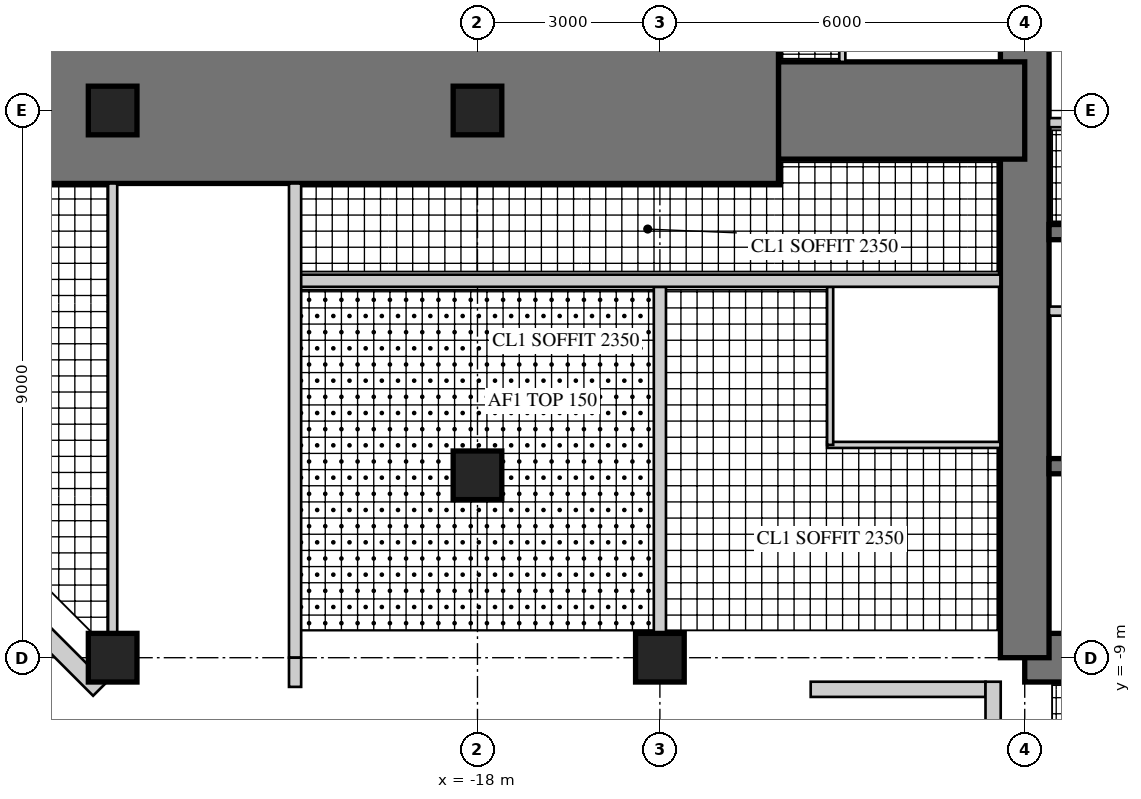
"""IFC4 building model, lengths in metres.
Left out: names, types, materials, properties, quantities, classifications, styles, units other than length and angle.
Written with IfcOpenShell. Run it as: python <this file> out.ifc"""

import sys

from ifc_helpers import new_model, si_unit, direction, frame, frame_2d, origin, origin_2d, place, context, subcontext, project, spatial, rectangle, hollow_rectangle, extrude, element, fill, save


model = new_model("IFC4")
c1 = context("Model", 3, precision=1e-05, world=origin(), true_north=direction((0.0, 1.0)))
c2 = subcontext(c1, "Body", "Model", "MODEL_VIEW")
j1 = project(units=[si_unit("LENGTHUNIT", "METRE"), si_unit("PLANEANGLEUNIT", "RADIAN")], contexts=[c1])
p1 = place(None, origin())
s1 = spatial("IfcSite", under=j1, at=p1, CompositionType="ELEMENT")
p2 = place(p1, origin())
s2 = spatial("IfcBuilding", under=s1, at=p2, CompositionType="ELEMENT")
p3 = place(p2, frame((0.0, 0.0, 242.5)))
s3 = spatial("IfcBuildingStorey", under=s2, at=p3, CompositionType="ELEMENT", Elevation=242.5)
p4 = place(p3, frame((-9.0, -9.0, 0.0), z_axis=(0.0, 0.0, 1.0), x_axis=(1.0, 0.0, 0.0)))
e1 = element("IfcWall", 1, at=p4, inside=s3, PredefinedType="SHEAR", context=c2, shape_type="SweptSolid", body=[
    extrude(rectangle(XDim=18.0, YDim=0.8, at=frame_2d((9.0, 0.0))), origin(), (0.0, 0.0, 1.0), 3.4),
])
p5 = place(p4, frame((9.8, 0.0, 0.0)))
e2 = element("IfcOpeningElement", 2, at=p5, cuts=e1, PredefinedType="OPENING", context=c2, shape_type="SweptSolid", body=[
    extrude(rectangle(XDim=1.0, YDim=2.4, at=frame_2d((0.5, 1.2))), frame((0.0, 0.41, 0.0), z_axis=(0.0, -1.0, 0.0), x_axis=(1.0, 0.0, 0.0)), (0.0, 0.0, 1.0), 0.82),
])
p6 = place(p3, frame((-9.0, 9.0, 0.0), z_axis=(0.0, 0.0, 1.0), x_axis=(0.0, -1.0, 0.0)))
e3 = element("IfcWall", 3, at=p6, inside=s3, PredefinedType="SHEAR", context=c2, shape_type="SweptSolid", body=[
    extrude(rectangle(XDim=18.0, YDim=0.8, at=frame_2d((9.0, 0.0))), origin(), (0.0, 0.0, 1.0), 3.4),
])
p7 = place(p6, frame((9.8, 0.0, 0.0)))
e4 = element("IfcOpeningElement", 4, at=p7, cuts=e3, PredefinedType="OPENING", context=c2, shape_type="SweptSolid", body=[
    extrude(rectangle(XDim=1.0, YDim=2.4, at=frame_2d((0.5, 1.2))), frame((0.0, 0.41, 0.0), z_axis=(0.0, -1.0, 0.0), x_axis=(1.0, 0.0, 0.0)), (0.0, 0.0, 1.0), 0.82),
])
p8 = place(p3, frame((-1.925, -2.0, 0.0), z_axis=(0.0, 0.0, 1.0), x_axis=(-1.0, 0.0, 0.0)))
e5 = element("IfcWall", 5, at=p8, inside=s3, PredefinedType="SHEAR", context=c2, shape_type="SweptSolid", body=[
    extrude(rectangle(XDim=6.675, YDim=0.25, at=frame_2d((3.337, 0.0))), origin(), (0.0, 0.0, 1.0), 3.4),
])
p9 = place(p3, frame((-1.925, -5.85, 0.0), z_axis=(0.0, 0.0, 1.0), x_axis=(-1.0, 0.0, 0.0)))
e6 = element("IfcWall", 6, at=p9, inside=s3, PredefinedType="SHEAR", context=c2, shape_type="SweptSolid", body=[
    extrude(rectangle(XDim=6.675, YDim=0.25, at=frame_2d((3.337, 0.0))), origin(), (0.0, 0.0, 1.0), 3.4),
])
p10 = place(p9, frame((0.496, 0.0, 0.0)))
e7 = element("IfcOpeningElement", 7, at=p10, cuts=e6, PredefinedType="OPENING", context=c2, shape_type="SweptSolid", body=[
    extrude(rectangle(XDim=1.1, YDim=2.2, at=frame_2d((0.55, 1.1))), frame((0.0, 0.135, 0.0), z_axis=(0.0, -1.0, 0.0), x_axis=(1.0, 0.0, 0.0)), (0.0, 0.0, 1.0), 0.27),
])
p11 = place(p9, frame((2.788, 0.0, 0.0)))
e8 = element("IfcOpeningElement", 8, at=p11, cuts=e6, PredefinedType="OPENING", context=c2, shape_type="SweptSolid", body=[
    extrude(rectangle(XDim=1.1, YDim=2.2, at=frame_2d((0.55, 1.1))), frame((0.0, 0.135, 0.0), z_axis=(0.0, -1.0, 0.0), x_axis=(1.0, 0.0, 0.0)), (0.0, 0.0, 1.0), 0.27),
])
p12 = place(p9, frame((5.079, 0.0, 0.0)))
e9 = element("IfcOpeningElement", 9, at=p12, cuts=e6, PredefinedType="OPENING", context=c2, shape_type="SweptSolid", body=[
    extrude(rectangle(XDim=1.1, YDim=2.2, at=frame_2d((0.55, 1.1))), frame((0.0, 0.135, 0.0), z_axis=(0.0, -1.0, 0.0), x_axis=(1.0, 0.0, 0.0)), (0.0, 0.0, 1.0), 0.27),
])
p13 = place(p3, frame((-1.925, -3.3, 0.0), z_axis=(0.0, 0.0, 1.0), x_axis=(-1.0, 0.0, 0.0)))
e10 = element("IfcWall", 10, at=p13, inside=s3, PredefinedType="PARTITIONING", context=c2, shape_type="SweptSolid", body=[
    extrude(rectangle(XDim=6.675, YDim=0.15, at=frame_2d((3.337, 0.0))), origin(), (0.0, 0.0, 1.0), 3.4),
])
p14 = place(p13, frame((0.075, 0.0, 0.0)))
e11 = element("IfcOpeningElement", 11, at=p14, cuts=e10, PredefinedType="OPENING", context=c2, shape_type="SweptSolid", body=[
    extrude(rectangle(XDim=0.8, YDim=2.1, at=frame_2d((0.4, 1.05))), frame((0.0, 0.085, 0.0), z_axis=(0.0, -1.0, 0.0), x_axis=(1.0, 0.0, 0.0)), (0.0, 0.0, 1.0), 0.17),
])
p15 = place(p13, frame((3.675, 0.0, 0.0)))
e12 = element("IfcOpeningElement", 12, at=p15, cuts=e10, PredefinedType="OPENING", context=c2, shape_type="SweptSolid", body=[
    extrude(rectangle(XDim=0.8, YDim=2.1, at=frame_2d((0.4, 1.05))), frame((0.0, 0.085, 0.0), z_axis=(0.0, -1.0, 0.0), x_axis=(1.0, 0.0, 0.0)), (0.0, 0.0, 1.0), 0.17),
])
p16 = place(p3, frame((-9.0, 0.0, 0.0), z_axis=(0.0, 0.0, 1.0), x_axis=(-1.0, 0.0, 0.0)))
e13 = element("IfcWall", 13, at=p16, inside=s3, PredefinedType="SHEAR", context=c2, shape_type="SweptSolid", body=[
    extrude(rectangle(XDim=4.05, YDim=1.6, at=frame_2d((2.025, 0.0))), origin(), (0.0, 0.0, 1.0), 3.4),
])
p17 = place(p3, frame((-13.05, 0.0, 0.0), z_axis=(0.0, 0.0, 1.0), x_axis=(-1.0, 0.0, 0.0)))
e14 = element("IfcWall", 14, at=p17, inside=s3, PredefinedType="SHEAR", context=c2, shape_type="SweptSolid", body=[
    extrude(rectangle(XDim=13.95, YDim=2.4, at=frame_2d((6.975, 0.0))), origin(), (0.0, 0.0, 1.0), 3.4),
])
p18 = place(p17, frame((0.3, 0.0, 0.0)))
e15 = element("IfcOpeningElement", 15, at=p18, cuts=e14, PredefinedType="OPENING", context=c2, shape_type="SweptSolid", body=[
    extrude(rectangle(XDim=1.0, YDim=2.15, at=frame_2d((0.5, 1.075))), frame((0.0, 1.21, 0.0), z_axis=(0.0, -1.0, 0.0), x_axis=(1.0, 0.0, 0.0)), (0.0, 0.0, 1.0), 2.42),
])
p19 = place(p17, frame((2.55, 0.0, 0.0)))
e16 = element("IfcOpeningElement", 16, at=p19, cuts=e14, PredefinedType="OPENING", context=c2, shape_type="SweptSolid", body=[
    extrude(rectangle(XDim=1.0, YDim=2.15, at=frame_2d((0.5, 1.075))), frame((0.0, 1.21, 0.0), z_axis=(0.0, -1.0, 0.0), x_axis=(1.0, 0.0, 0.0)), (0.0, 0.0, 1.0), 2.42),
])
p20 = place(p17, frame((9.25, 0.0, 0.0)))
e17 = element("IfcOpeningElement", 17, at=p20, cuts=e14, PredefinedType="OPENING", context=c2, shape_type="SweptSolid", body=[
    extrude(rectangle(XDim=1.0, YDim=2.2, at=frame_2d((0.5, 1.1))), frame((0.0, 1.21, 0.0), z_axis=(0.0, -1.0, 0.0), x_axis=(1.0, 0.0, 0.0)), (0.0, 0.0, 1.0), 2.42),
])
for number, where, z_axis, x_axis in (
    (18, (-15.0, -9.0, 0.0), (0.0, 0.0, 1.0), (1.0, 0.0, 0.0)),
    (19, (-24.0, -9.0, 0.0), (0.0, 0.0, 1.0), (1.0, 0.0, 0.0)),
    (20, (-18.0, 0.0, 0.0), (0.0, 0.0, 1.0), (1.0, 0.0, 0.0)),
    (21, (-18.0, -6.0, 0.0), (0.0, 0.0, 1.0), (1.0, 0.0, 0.0)),
    (22, (-24.0, 0.0, 0.0), (0.0, 0.0, 1.0), (1.0, 0.0, 0.0)),
):
    element("IfcColumn", number, at=place(p3, frame(where, z_axis=z_axis, x_axis=x_axis)), inside=s3, PredefinedType="COLUMN", context=c2, shape_type="SweptSolid", body=[
        extrude(rectangle(XDim=0.8, YDim=0.8, at=origin_2d()), origin(), (0.0, 0.0, 1.0), 3.4),
    ])
p21 = place(p3, frame((-27.6, -6.135, 0.0), z_axis=(0.0, 0.0, 1.0), x_axis=(0.707132283189, -0.707081278264, 0.0)))
e23 = element("IfcWall", 23, at=p21, inside=s3, PredefinedType="SOLIDWALL", context=c2, shape_type="SweptSolid", body=[
    extrude(rectangle(XDim=4.787, YDim=0.3, at=frame_2d((2.393, 0.0))), origin(), (0.0, 0.0, 1.0), 3.22),
])
p22 = place(p21, frame((1.943, 0.0, 0.3)))
e24 = element("IfcOpeningElement", 24, at=p22, cuts=e23, PredefinedType="OPENING", context=c2, shape_type="SweptSolid", body=[
    extrude(rectangle(XDim=0.9, YDim=2.4, at=frame_2d((0.45, 1.2))), frame((0.0, 0.16, 0.0), z_axis=(0.0, -1.0, 0.0), x_axis=(1.0, 0.0, 0.0)), (0.0, 0.0, 1.0), 0.32),
])
p23 = place(p3, frame((-12.52, -9.52, 0.0), z_axis=(0.0, 0.0, 1.0), x_axis=(1.0, 0.0, 0.0)))
e25 = element("IfcWall", 25, at=p23, inside=s3, PredefinedType="SOLIDWALL", context=c2, shape_type="SweptSolid", body=[
    extrude(rectangle(XDim=2.875, YDim=0.25, at=frame_2d((1.438, 0.0))), origin(), (0.0, 0.0, 1.0), 3.22),
])
p24 = place(p23, frame((0.6, 0.0, 0.0)))
e26 = element("IfcOpeningElement", 26, at=p24, cuts=e25, PredefinedType="OPENING", context=c2, shape_type="SweptSolid", body=[
    extrude(rectangle(XDim=1.0, YDim=2.2, at=frame_2d((0.5, 1.1))), frame((0.0, 0.135, 0.0), z_axis=(0.0, -1.0, 0.0), x_axis=(1.0, 0.0, 0.0)), (0.0, 0.0, 1.0), 0.27),
])
p25 = place(p3, frame((-9.52, -9.395, 0.0), z_axis=(0.0, 0.0, 1.0), x_axis=(0.0, -1.0, 0.0)))
e27 = element("IfcWall", 27, at=p25, inside=s3, PredefinedType="SOLIDWALL", context=c2, shape_type="SweptSolid", body=[
    extrude(rectangle(XDim=3.125, YDim=0.25, at=frame_2d((1.562, 0.0))), origin(), (0.0, 0.0, 1.0), 3.22),
])
p26 = place(p25, frame((0.6, 0.0, 0.0)))
e28 = element("IfcOpeningElement", 28, at=p26, cuts=e27, PredefinedType="OPENING", context=c2, shape_type="SweptSolid", body=[
    extrude(rectangle(XDim=1.0, YDim=2.2, at=frame_2d((0.5, 1.1))), frame((0.0, 0.135, 0.0), z_axis=(0.0, -1.0, 0.0), x_axis=(1.0, 0.0, 0.0)), (0.0, 0.0, 1.0), 0.27),
])
p27 = place(p3, frame((-2.325, -0.2, 0.0), z_axis=(0.0, 0.0, 1.0), x_axis=(-1.0, 0.0, 0.0)))
e29 = element("IfcWall", 29, at=p27, inside=s3, PredefinedType="PARTITIONING", context=c2, shape_type="SweptSolid", body=[
    extrude(rectangle(XDim=6.275, YDim=0.15, at=frame_2d((3.138, 0.0))), origin(), (0.0, 0.0, 1.0), 3.22),
])
p28 = place(p27, frame((0.4, 0.0, 0.0)))
e30 = element("IfcOpeningElement", 30, at=p28, cuts=e29, PredefinedType="OPENING", context=c2, shape_type="SweptSolid", body=[
    extrude(rectangle(XDim=1.0, YDim=2.1, at=frame_2d((0.5, 1.05))), frame((0.0, 0.085, 0.0), z_axis=(0.0, -1.0, 0.0), x_axis=(1.0, 0.0, 0.0)), (0.0, 0.0, 1.0), 0.17),
])
p29 = place(p3, frame((-9.4, -5.5, 0.0), z_axis=(0.0, 0.0, 1.0), x_axis=(-1.0, 0.0, 0.0)))
e31 = element("IfcWall", 31, at=p29, inside=s3, PredefinedType="PARTITIONING", context=c2, shape_type="SweptSolid", body=[
    extrude(rectangle(XDim=2.85, YDim=0.1, at=frame_2d((1.425, 0.0))), origin(), (0.0, 0.0, 1.0), 3.22),
])
p30 = place(p3, frame((-12.2, -2.9, 0.0), z_axis=(0.0, 0.0, 1.0), x_axis=(0.0, -1.0, 0.0)))
e32 = element("IfcWall", 32, at=p30, inside=s3, PredefinedType="PARTITIONING", context=c2, shape_type="SweptSolid", body=[
    extrude(rectangle(XDim=2.6, YDim=0.1, at=frame_2d((1.3, 0.0))), origin(), (0.0, 0.0, 1.0), 3.22),
])
p31 = place(p30, frame((0.55, 0.0, 0.0)))
e33 = element("IfcOpeningElement", 33, at=p31, cuts=e32, PredefinedType="OPENING", context=c2, shape_type="SweptSolid", body=[
    extrude(rectangle(XDim=0.9, YDim=2.1, at=frame_2d((0.45, 1.05))), frame((0.0, 0.06, 0.0), z_axis=(0.0, -1.0, 0.0), x_axis=(1.0, 0.0, 0.0)), (0.0, 0.0, 1.0), 0.12),
])
p32 = place(p3, frame((-12.0, 3.4, 0.0), z_axis=(0.0, 0.0, 1.0), x_axis=(0.0, -1.0, 0.0)))
e34 = element("IfcWall", 34, at=p32, inside=s3, PredefinedType="PARTITIONING", context=c2, shape_type="SweptSolid", body=[
    extrude(rectangle(XDim=2.6, YDim=0.1, at=frame_2d((1.3, 0.0))), origin(), (0.0, 0.0, 1.0), 3.22),
])
p33 = place(p32, frame((0.55, 0.0, 0.0)))
e35 = element("IfcOpeningElement", 35, at=p33, cuts=e34, PredefinedType="OPENING", context=c2, shape_type="SweptSolid", body=[
    extrude(rectangle(XDim=0.9, YDim=2.1, at=frame_2d((0.45, 1.05))), frame((0.0, 0.06, 0.0), z_axis=(0.0, -1.0, 0.0), x_axis=(1.0, 0.0, 0.0)), (0.0, 0.0, 1.0), 0.12),
])
p34 = place(p3, frame((-15.0, -2.9, 0.0), z_axis=(0.0, 0.0, 1.0), x_axis=(0.0, -1.0, 0.0)))
e36 = element("IfcWall", 36, at=p34, inside=s3, PredefinedType="SOLIDWALL", context=c2, shape_type="SweptSolid", body=[
    extrude(rectangle(XDim=5.7, YDim=0.2, at=frame_2d((2.85, 0.0))), origin(), (0.0, 0.0, 1.0), 2.52),
])
p35 = place(p3, frame((-9.4, -2.8, 0.0), z_axis=(0.0, 0.0, 1.0), x_axis=(-1.0, 0.0, 0.0)))
e37 = element("IfcWall", 37, at=p35, inside=s3, PredefinedType="SOLIDWALL", context=c2, shape_type="SweptSolid", body=[
    extrude(rectangle(XDim=11.6, YDim=0.2, at=frame_2d((5.8, 0.0))), origin(), (0.0, 0.0, 1.0), 3.22),
])
p36 = place(p35, frame((3.4, 0.0, 0.0)))
e38 = element("IfcOpeningElement", 38, at=p36, cuts=e37, PredefinedType="OPENING", context=c2, shape_type="SweptSolid", body=[
    extrude(rectangle(XDim=1.0, YDim=2.15, at=frame_2d((0.5, 1.075))), frame((0.0, 0.11, 0.0), z_axis=(0.0, -1.0, 0.0), x_axis=(1.0, 0.0, 0.0)), (0.0, 0.0, 1.0), 0.22),
])
p37 = place(p35, frame((6.8, 0.0, 0.0)))
e39 = element("IfcOpeningElement", 39, at=p37, cuts=e37, PredefinedType="OPENING", context=c2, shape_type="SweptSolid", body=[
    extrude(rectangle(XDim=1.0, YDim=2.2, at=frame_2d((0.5, 1.1))), frame((0.0, 0.11, 0.0), z_axis=(0.0, -1.0, 0.0), x_axis=(1.0, 0.0, 0.0)), (0.0, 0.0, 1.0), 0.22),
])
p38 = place(p3, frame((-24.0, -1.2, 0.0), z_axis=(0.0, 0.0, 1.0), x_axis=(0.0, -1.0, 0.0)))
e40 = element("IfcWall", 40, at=p38, inside=s3, PredefinedType="PARTITIONING", context=c2, shape_type="SweptSolid", body=[
    extrude(rectangle(XDim=7.4, YDim=0.15, at=frame_2d((3.7, 0.0))), origin(), (0.0, 0.0, 1.0), 2.52),
])
p39 = place(p38, frame((1.2, 0.0, 0.0)))
e41 = element("IfcOpeningElement", 41, at=p39, cuts=e40, PredefinedType="OPENING", context=c2, shape_type="SweptSolid", body=[
    extrude(rectangle(XDim=1.0, YDim=2.2, at=frame_2d((0.5, 1.1))), frame((0.0, 0.085, 0.0), z_axis=(0.0, -1.0, 0.0), x_axis=(1.0, 0.0, 0.0)), (0.0, 0.0, 1.0), 0.17),
])
p40 = place(p3, frame((-21.0, -1.2, 0.0), z_axis=(0.0, 0.0, 1.0), x_axis=(0.0, -1.0, 0.0)))
e42 = element("IfcWall", 42, at=p40, inside=s3, PredefinedType="SOLIDWALL", context=c2, shape_type="SweptSolid", body=[
    extrude(rectangle(XDim=7.8, YDim=0.2, at=frame_2d((3.9, 0.0))), origin(), (0.0, 0.0, 1.0), 2.67),
])
p41 = place(p40, frame((0.35, 0.0, 0.0)))
e43 = element("IfcOpeningElement", 43, at=p41, cuts=e42, PredefinedType="OPENING", context=c2, shape_type="SweptSolid", body=[
    extrude(rectangle(XDim=1.0, YDim=2.2, at=frame_2d((0.5, 1.1))), frame((0.0, 0.11, 0.0), z_axis=(0.0, -1.0, 0.0), x_axis=(1.0, 0.0, 0.0)), (0.0, 0.0, 1.0), 0.22),
])
p42 = place(p3, frame((-21.0, -9.0, 0.0), z_axis=(0.0, 0.0, 1.0), x_axis=(0.0, -1.0, 0.0)))
e44 = element("IfcWall", 44, at=p42, inside=s3, PredefinedType="SOLIDWALL", context=c2, shape_type="SweptSolid", body=[
    extrude(rectangle(XDim=0.48, YDim=0.2, at=frame_2d((0.24, 0.0))), origin(), (0.0, 0.0, 1.0), 3.22),
])
p43 = place(p24, origin())
e45 = element("IfcDoor", 45, at=p43, inside=s3, OperationType="SINGLE_SWING_RIGHT", PredefinedType="DOOR", context=c2, shape_type="SweptSolid", body=[
    extrude(hollow_rectangle(XDim=1.0, YDim=2.2, WallThickness=0.06, at=frame_2d((0.5, 1.1))), frame((0.0, 0.025, 0.0), z_axis=(0.0, -1.0, 0.0), x_axis=(1.0, 0.0, 0.0)), (0.0, 0.0, 1.0), 0.05),
    extrude(rectangle(XDim=0.879, YDim=2.079, at=frame_2d((0.5, 1.1))), frame((0.0, 0.025, 0.0), z_axis=(0.0, -1.0, 0.0), x_axis=(1.0, 0.0, 0.0)), (0.0, 0.0, 1.0), 0.05),
])
fill(e26, e45)
p44 = place(p26, origin())
e46 = element("IfcDoor", 46, at=p44, inside=s3, OperationType="SINGLE_SWING_LEFT", PredefinedType="DOOR", context=c2, shape_type="SweptSolid", body=[
    extrude(hollow_rectangle(XDim=1.0, YDim=2.2, WallThickness=0.06, at=frame_2d((0.5, 1.1))), frame((0.0, 0.025, 0.0), z_axis=(0.0, -1.0, 0.0), x_axis=(1.0, 0.0, 0.0)), (0.0, 0.0, 1.0), 0.05),
    extrude(rectangle(XDim=0.879, YDim=2.079, at=frame_2d((0.5, 1.1))), frame((0.0, 0.025, 0.0), z_axis=(0.0, -1.0, 0.0), x_axis=(1.0, 0.0, 0.0)), (0.0, 0.0, 1.0), 0.05),
])
fill(e28, e46)
p45 = place(p31, origin())
e47 = element("IfcDoor", 47, at=p45, inside=s3, OperationType="SINGLE_SWING_LEFT", PredefinedType="DOOR", context=c2, shape_type="SweptSolid", body=[
    extrude(rectangle(XDim=0.9, YDim=2.1, at=frame_2d((0.45, 1.05))), frame((0.0, 0.025, 0.0), z_axis=(0.0, -1.0, 0.0), x_axis=(1.0, 0.0, 0.0)), (0.0, 0.0, 1.0), 0.05),
])
fill(e33, e47)
p46 = place(p36, origin())
e48 = element("IfcDoor", 48, at=p46, inside=s3, OperationType="SINGLE_SWING_LEFT", PredefinedType="DOOR", context=c2, shape_type="SweptSolid", body=[
    extrude(rectangle(XDim=1.0, YDim=2.15, at=frame_2d((0.5, 1.075))), frame((0.0, 0.025, 0.0), z_axis=(0.0, -1.0, 0.0), x_axis=(1.0, 0.0, 0.0)), (0.0, 0.0, 1.0), 0.05),
])
fill(e38, e48)
p47 = place(p37, origin())
e49 = element("IfcDoor", 49, at=p47, inside=s3, OperationType="SINGLE_SWING_LEFT", PredefinedType="DOOR", context=c2, shape_type="SweptSolid", body=[
    extrude(rectangle(XDim=1.0, YDim=2.2, at=frame_2d((0.5, 1.1))), frame((0.0, 0.025, 0.0), z_axis=(0.0, -1.0, 0.0), x_axis=(1.0, 0.0, 0.0)), (0.0, 0.0, 1.0), 0.05),
])
fill(e39, e49)
p48 = place(p39, frame((1.0, 0.0, 0.0), z_axis=(0.0, 0.0, 1.0), x_axis=(-1.0, 0.0, 0.0)))
e50 = element("IfcDoor", 50, at=p48, inside=s3, OperationType="SINGLE_SWING_RIGHT", PredefinedType="DOOR", context=c2, shape_type="SweptSolid", body=[
    extrude(rectangle(XDim=1.0, YDim=2.2, at=frame_2d((0.5, 1.1))), frame((0.0, 0.025, 0.0), z_axis=(0.0, -1.0, 0.0), x_axis=(1.0, 0.0, 0.0)), (0.0, 0.0, 1.0), 0.05),
])
fill(e41, e50)
p49 = place(p41, frame((1.0, 0.0, 0.0), z_axis=(0.0, 0.0, 1.0), x_axis=(-1.0, 0.0, 0.0)))
e51 = element("IfcDoor", 51, at=p49, inside=s3, OperationType="SINGLE_SWING_RIGHT", PredefinedType="DOOR", context=c2, shape_type="SweptSolid", body=[
    extrude(rectangle(XDim=1.0, YDim=2.2, at=frame_2d((0.5, 1.1))), frame((0.0, 0.025, 0.0), z_axis=(0.0, -1.0, 0.0), x_axis=(1.0, 0.0, 0.0)), (0.0, 0.0, 1.0), 0.05),
])
fill(e43, e51)
p50 = place(p18, frame((1.0, 0.0, 0.0), z_axis=(0.0, 0.0, 1.0), x_axis=(-1.0, 0.0, 0.0)))
e52 = element("IfcDoor", 52, at=p50, inside=s3, OperationType="SINGLE_SWING_LEFT", PredefinedType="DOOR", context=c2, shape_type="SweptSolid", body=[
    extrude(rectangle(XDim=1.0, YDim=2.15, at=frame_2d((0.5, 1.075))), frame((0.0, 0.025, 0.0), z_axis=(0.0, -1.0, 0.0), x_axis=(1.0, 0.0, 0.0)), (0.0, 0.0, 1.0), 0.05),
])
fill(e15, e52)
p51 = place(p19, frame((1.0, 0.0, 0.0), z_axis=(0.0, 0.0, 1.0), x_axis=(-1.0, 0.0, 0.0)))
e53 = element("IfcDoor", 53, at=p51, inside=s3, OperationType="SINGLE_SWING_RIGHT", PredefinedType="DOOR", context=c2, shape_type="SweptSolid", body=[
    extrude(rectangle(XDim=1.0, YDim=2.15, at=frame_2d((0.5, 1.075))), frame((0.0, 0.025, 0.0), z_axis=(0.0, -1.0, 0.0), x_axis=(1.0, 0.0, 0.0)), (0.0, 0.0, 1.0), 0.05),
])
fill(e16, e53)
p52 = place(p20, origin())
e54 = element("IfcDoor", 54, at=p52, inside=s3, OperationType="SINGLE_SWING_RIGHT", PredefinedType="DOOR", context=c2, shape_type="SweptSolid", body=[
    extrude(rectangle(XDim=1.0, YDim=2.2, at=frame_2d((0.5, 1.1))), frame((0.0, 0.025, 0.0), z_axis=(0.0, -1.0, 0.0), x_axis=(1.0, 0.0, 0.0)), (0.0, 0.0, 1.0), 0.05),
])
fill(e17, e54)
p53 = place(p7, origin())
e55 = element("IfcDoor", 55, at=p53, inside=s3, OperationType="SINGLE_SWING_RIGHT", PredefinedType="DOOR", context=c2, shape_type="SweptSolid", body=[
    extrude(rectangle(XDim=1.0, YDim=2.4, at=frame_2d((0.5, 1.2))), frame((0.0, 0.055, 0.0), z_axis=(0.0, -1.0, 0.0), x_axis=(1.0, 0.0, 0.0)), (0.0, 0.0, 1.0), 0.05),
])
fill(e4, e55)
save(model, sys.argv[1])
